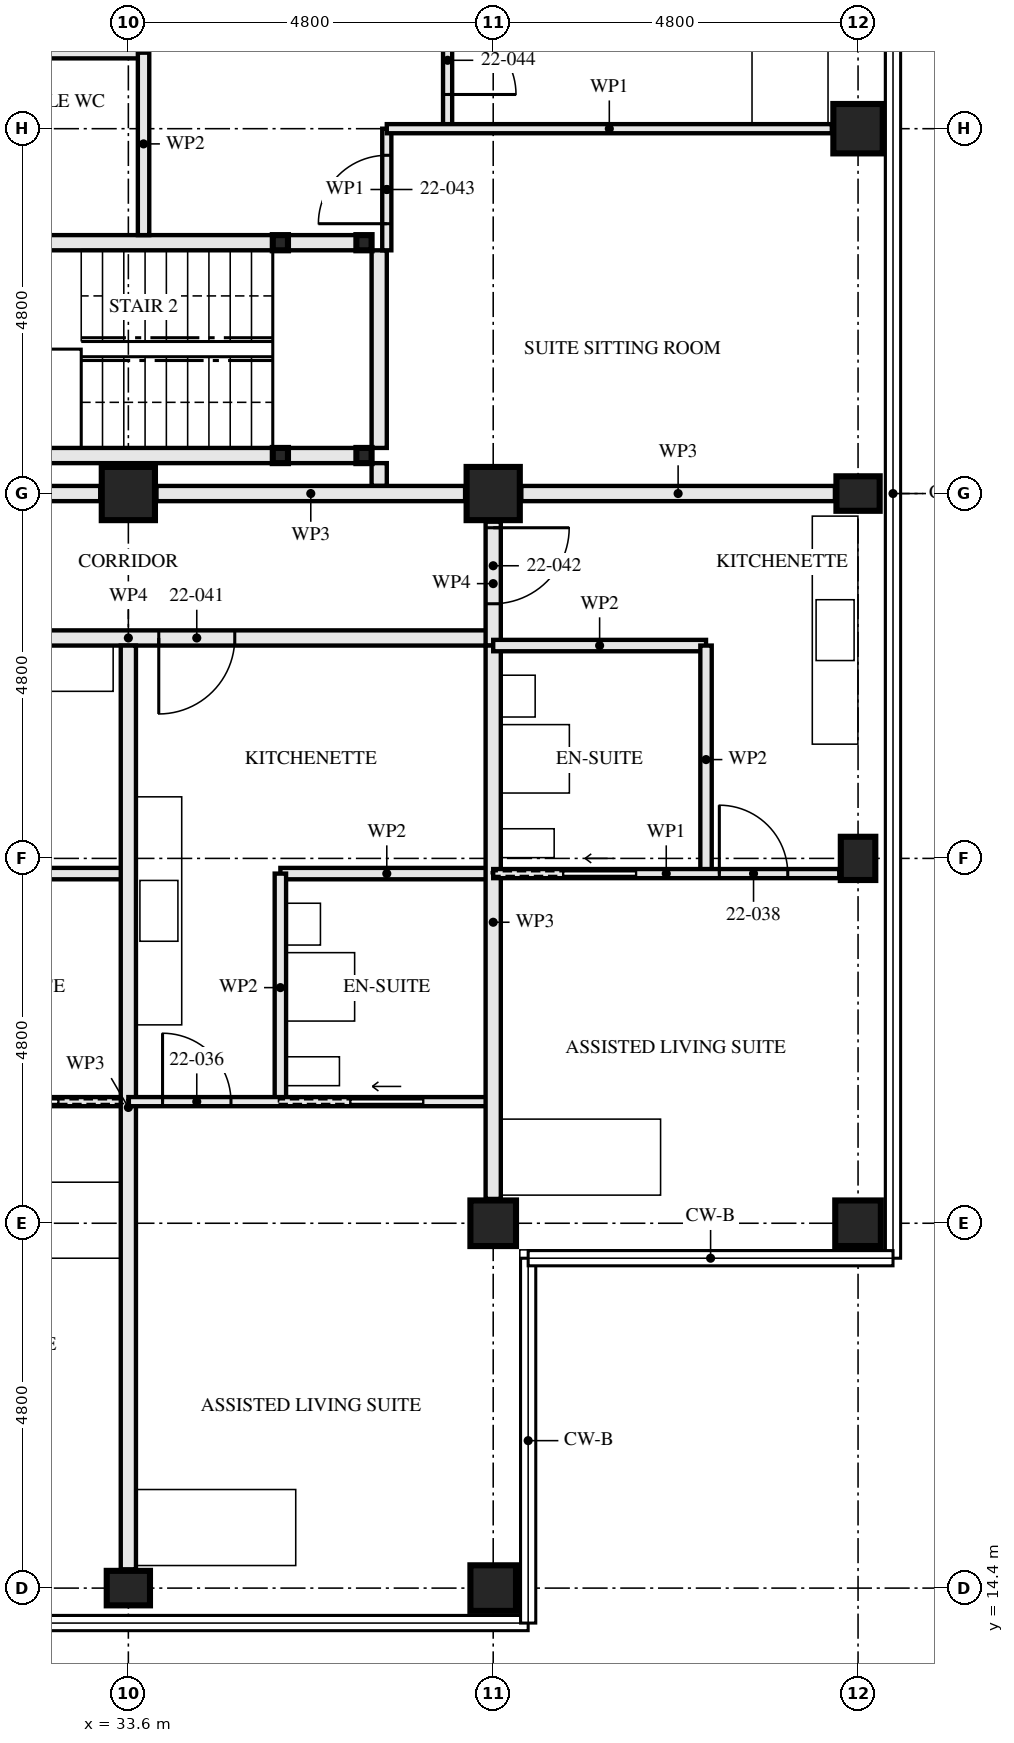
"""IFC4 building model, lengths in metres.
Left out: names, types, materials, properties, quantities, classifications, styles, units other than length and angle.
Written with IfcOpenShell. Run it as: python <this file> out.ifc"""

import sys

from ifc_helpers import new_model, si_unit, direction, frame, frame_2d, origin, origin_2d, place, context, subcontext, project, spatial, rectangle, hollow_rectangle, i_section, extrude, element, fill, save


model = new_model("IFC4")
c1 = context("Model", 3, precision=1e-05, world=origin(), true_north=direction((0.0, 1.0)))
c2 = subcontext(c1, "Body", "Model", "MODEL_VIEW")
j1 = project(units=[si_unit("LENGTHUNIT", "METRE"), si_unit("PLANEANGLEUNIT", "RADIAN")], contexts=[c1])
p1 = place(None, origin())
s1 = spatial("IfcSite", under=j1, at=p1, CompositionType="ELEMENT")
p2 = place(p1, origin())
s2 = spatial("IfcBuilding", under=s1, at=p2, CompositionType="ELEMENT")
p3 = place(p2, frame((0.0, 0.0, 84.0)))
s3 = spatial("IfcBuildingStorey", under=s2, at=p3, CompositionType="ELEMENT", Elevation=84.0)
p4 = place(p3, frame((33.6, 14.4, 0.0), z_axis=(0.0, 0.0, 1.0), x_axis=(0.0, 1.0, 0.0)))
e1 = element("IfcColumn", 1, at=p4, inside=s3, PredefinedType="COLUMN", context=c2, shape_type="SweptSolid", body=[
    extrude(i_section(OverallWidth=0.454, OverallDepth=0.569, WebThickness=0.078, FlangeThickness=0.125, FilletRadius=0.015, at=origin_2d()), origin(), (0.0, 0.0, 1.0), 3.5),
])
p5 = place(p3, frame((33.6, 28.8, 0.0), z_axis=(0.0, 0.0, 1.0), x_axis=(0.0, 1.0, 0.0)))
e2 = element("IfcColumn", 2, at=p5, inside=s3, PredefinedType="COLUMN", context=c2, shape_type="SweptSolid", body=[
    extrude(hollow_rectangle(XDim=0.7, YDim=0.7, WallThickness=0.06, at=origin_2d()), origin(), (0.0, 0.0, 1.0), 3.5),
])
for number, where, z_axis, x_axis in (
    (3, (38.4, 14.4, 0.0), (0.0, 0.0, 1.0), (0.0, 1.0, 0.0)),
    (4, (38.4, 19.2, 0.0), (0.0, 0.0, 1.0), (0.0, 1.0, 0.0)),
):
    element("IfcColumn", number, at=place(p3, frame(where, z_axis=z_axis, x_axis=x_axis)), inside=s3, PredefinedType="COLUMN", context=c2, shape_type="SweptSolid", body=[
        extrude(hollow_rectangle(XDim=0.6, YDim=0.6, WallThickness=0.05, at=origin_2d()), origin(), (0.0, 0.0, 1.0), 3.5),
    ])
p6 = place(p3, frame((38.4, 28.8, 0.0), z_axis=(0.0, 0.0, 1.0), x_axis=(0.0, 1.0, 0.0)))
e5 = element("IfcColumn", 5, at=p6, inside=s3, PredefinedType="COLUMN", context=c2, shape_type="SweptSolid", body=[
    extrude(hollow_rectangle(XDim=0.7, YDim=0.7, WallThickness=0.06, at=origin_2d()), origin(), (0.0, 0.0, 1.0), 3.5),
])
p7 = place(p3, frame((43.2, 19.2, 0.0), z_axis=(0.0, 0.0, 1.0), x_axis=(0.0, 1.0, 0.0)))
e6 = element("IfcColumn", 6, at=p7, inside=s3, PredefinedType="COLUMN", context=c2, shape_type="SweptSolid", body=[
    extrude(hollow_rectangle(XDim=0.6, YDim=0.6, WallThickness=0.05, at=origin_2d()), origin(), (0.0, 0.0, 1.0), 3.5),
])
for number, where, z_axis, x_axis in (
    (7, (43.2, 24.0, 0.0), (0.0, 0.0, 1.0), (1.0, 0.0, 0.0)),
    (8, (43.2, 28.8, 0.0), (0.0, 0.0, 1.0), (0.0, 1.0, 0.0)),
):
    element("IfcColumn", number, at=place(p3, frame(where, z_axis=z_axis, x_axis=x_axis)), inside=s3, PredefinedType="COLUMN", context=c2, shape_type="SweptSolid", body=[
        extrude(i_section(OverallWidth=0.454, OverallDepth=0.569, WebThickness=0.078, FlangeThickness=0.125, FilletRadius=0.015, at=origin_2d()), origin(), (0.0, 0.0, 1.0), 3.5),
    ])
p8 = place(p3, frame((43.2, 33.6, 0.0), z_axis=(0.0, 0.0, 1.0), x_axis=(1.0, 0.0, 0.0)))
e9 = element("IfcColumn", 9, at=p8, inside=s3, PredefinedType="COLUMN", context=c2, shape_type="SweptSolid", body=[
    extrude(hollow_rectangle(XDim=0.65, YDim=0.65, WallThickness=0.08, at=origin_2d()), origin(), (0.0, 0.0, 1.0), 3.5),
])
for number, where, z_axis, x_axis in (
    (10, (36.7, 29.3, 0.0), (0.0, 0.0, 1.0), (1.0, 0.0, 0.0)),
    (11, (36.7, 32.1, 0.0), (0.0, 0.0, 1.0), (1.0, 0.0, 0.0)),
    (12, (35.6, 29.3, 0.0), (0.0, 0.0, 1.0), (1.0, 0.0, 0.0)),
    (13, (35.6, 32.1, 0.0), (0.0, 0.0, 1.0), (1.0, 0.0, 0.0)),
):
    element("IfcColumn", number, at=place(p3, frame(where, z_axis=z_axis, x_axis=x_axis)), inside=s3, PredefinedType="COLUMN", context=c2, shape_type="SweptSolid", body=[
        extrude(hollow_rectangle(XDim=0.2, YDim=0.2, WallThickness=0.008, at=origin_2d()), origin(), (0.0, 0.0, 1.0), 3.33),
    ])
p9 = place(p3, frame((30.8, 23.8, 0.0), z_axis=(0.0, 0.0, 1.0), x_axis=(1.0, 0.0, 0.0)))
e14 = element("IfcWall", 14, at=p9, inside=s3, PredefinedType="PARTITIONING", context=c2, shape_type="SweptSolid", body=[
    extrude(rectangle(XDim=2.8, YDim=0.15, at=frame_2d((1.4, 0.0))), origin(), (0.0, 0.0, 1.0), 3.33),
])
p10 = place(p3, frame((28.8, 20.8, 0.0), z_axis=(0.0, 0.0, 1.0), x_axis=(1.0, 0.0, 0.0)))
e15 = element("IfcWall", 15, at=p10, inside=s3, PredefinedType="PARTITIONING", context=c2, shape_type="SweptSolid", body=[
    extrude(rectangle(XDim=4.8, YDim=0.12, at=frame_2d((2.4, 0.0))), origin(), (0.0, 0.0, 1.0), 3.33),
])
p11 = place(p10, frame((0.45, 0.0, 0.0)))
e16 = element("IfcOpeningElement", 16, at=p11, cuts=e15, PredefinedType="OPENING", context=c2, shape_type="SweptSolid", body=[
    extrude(rectangle(XDim=0.9, YDim=2.1, at=frame_2d((0.45, 1.05))), frame((0.0, 0.071, 0.0), z_axis=(0.0, -1.0, 0.0), x_axis=(1.0, 0.0, 0.0)), (0.0, 0.0, 1.0), 0.141),
])
p12 = place(p10, frame((2.925, 0.0, 0.0)))
e17 = element("IfcOpeningElement", 17, at=p12, cuts=e15, PredefinedType="OPENING", context=c2, shape_type="SweptSolid", body=[
    extrude(rectangle(XDim=0.95, YDim=2.1, at=frame_2d((0.475, 1.05))), frame((0.0, 0.071, 0.0), z_axis=(0.0, -1.0, 0.0), x_axis=(1.0, 0.0, 0.0)), (0.0, 0.0, 1.0), 0.141),
])
p13 = place(p3, frame((33.6, 14.647, 0.0), z_axis=(0.0, 0.0, 1.0), x_axis=(0.0, 1.0, 0.0)))
e18 = element("IfcWall", 18, at=p13, inside=s3, PredefinedType="PARTITIONING", context=c2, shape_type="SweptSolid", body=[
    extrude(rectangle(XDim=12.153, YDim=0.2, at=frame_2d((6.077, 0.0))), origin(), (0.0, 0.0, 1.0), 2.55),
])
p14 = place(p3, frame((35.6, 20.8, 0.0), z_axis=(0.0, 0.0, 1.0), x_axis=(0.0, 1.0, 0.0)))
e19 = element("IfcWall", 19, at=p14, inside=s3, PredefinedType="PARTITIONING", context=c2, shape_type="SweptSolid", body=[
    extrude(rectangle(XDim=3.0, YDim=0.15, at=frame_2d((1.5, 0.0))), origin(), (0.0, 0.0, 1.0), 3.33),
])
p15 = place(p3, frame((35.6, 23.8, 0.0), z_axis=(0.0, 0.0, 1.0), x_axis=(1.0, 0.0, 0.0)))
e20 = element("IfcWall", 20, at=p15, inside=s3, PredefinedType="PARTITIONING", context=c2, shape_type="SweptSolid", body=[
    extrude(rectangle(XDim=2.8, YDim=0.15, at=frame_2d((1.4, 0.0))), origin(), (0.0, 0.0, 1.0), 3.33),
])
p16 = place(p3, frame((33.6, 20.8, 0.0), z_axis=(0.0, 0.0, 1.0), x_axis=(1.0, 0.0, 0.0)))
e21 = element("IfcWall", 21, at=p16, inside=s3, PredefinedType="PARTITIONING", context=c2, shape_type="SweptSolid", body=[
    extrude(rectangle(XDim=4.8, YDim=0.12, at=frame_2d((2.4, 0.0))), origin(), (0.0, 0.0, 1.0), 3.33),
])
p17 = place(p16, frame((0.45, 0.0, 0.0)))
e22 = element("IfcOpeningElement", 22, at=p17, cuts=e21, PredefinedType="OPENING", context=c2, shape_type="SweptSolid", body=[
    extrude(rectangle(XDim=0.9, YDim=2.1, at=frame_2d((0.45, 1.05))), frame((0.0, 0.071, 0.0), z_axis=(0.0, -1.0, 0.0), x_axis=(1.0, 0.0, 0.0)), (0.0, 0.0, 1.0), 0.141),
])
p18 = place(p16, frame((2.925, 0.0, 0.0)))
e23 = element("IfcOpeningElement", 23, at=p18, cuts=e21, PredefinedType="OPENING", context=c2, shape_type="SweptSolid", body=[
    extrude(rectangle(XDim=0.95, YDim=2.1, at=frame_2d((0.475, 1.05))), frame((0.0, 0.071, 0.0), z_axis=(0.0, -1.0, 0.0), x_axis=(1.0, 0.0, 0.0)), (0.0, 0.0, 1.0), 0.141),
])
p19 = place(p3, frame((38.4, 19.52, 0.0), z_axis=(0.0, 0.0, 1.0), x_axis=(0.0, 1.0, 0.0)))
e24 = element("IfcWall", 24, at=p19, inside=s3, PredefinedType="PARTITIONING", context=c2, shape_type="SweptSolid", body=[
    extrude(rectangle(XDim=7.28, YDim=0.2, at=frame_2d((3.64, 0.0))), origin(), (0.0, 0.0, 1.0), 2.55),
])
p20 = place(p3, frame((41.2, 23.8, 0.0), z_axis=(0.0, 0.0, 1.0), x_axis=(0.0, 1.0, 0.0)))
e25 = element("IfcWall", 25, at=p20, inside=s3, PredefinedType="PARTITIONING", context=c2, shape_type="SweptSolid", body=[
    extrude(rectangle(XDim=3.0, YDim=0.15, at=frame_2d((1.5, 0.0))), origin(), (0.0, 0.0, 1.0), 2.55),
])
p21 = place(p3, frame((38.4, 26.8, 0.0), z_axis=(0.0, 0.0, 1.0), x_axis=(1.0, 0.0, 0.0)))
e26 = element("IfcWall", 26, at=p21, inside=s3, PredefinedType="PARTITIONING", context=c2, shape_type="SweptSolid", body=[
    extrude(rectangle(XDim=2.8, YDim=0.15, at=frame_2d((1.4, 0.0))), origin(), (0.0, 0.0, 1.0), 3.33),
])
p22 = place(p3, frame((38.4, 23.8, 0.0), z_axis=(0.0, 0.0, 1.0), x_axis=(1.0, 0.0, 0.0)))
e27 = element("IfcWall", 27, at=p22, inside=s3, PredefinedType="PARTITIONING", context=c2, shape_type="SweptSolid", body=[
    extrude(rectangle(XDim=4.553, YDim=0.12, at=frame_2d((2.276, 0.0))), origin(), (0.0, 0.0, 1.0), 3.33),
])
p23 = place(p22, frame((2.975, 0.0, 0.0)))
e28 = element("IfcOpeningElement", 28, at=p23, cuts=e27, PredefinedType="OPENING", context=c2, shape_type="SweptSolid", body=[
    extrude(rectangle(XDim=0.9, YDim=2.1, at=frame_2d((0.45, 1.05))), frame((0.0, 0.071, 0.0), z_axis=(0.0, -1.0, 0.0), x_axis=(1.0, 0.0, 0.0)), (0.0, 0.0, 1.0), 0.141),
])
p24 = place(p22, frame((0.925, 0.0, 0.0)))
e29 = element("IfcOpeningElement", 29, at=p24, cuts=e27, PredefinedType="OPENING", context=c2, shape_type="SweptSolid", body=[
    extrude(rectangle(XDim=0.95, YDim=2.1, at=frame_2d((0.475, 1.05))), frame((0.0, 0.071, 0.0), z_axis=(0.0, -1.0, 0.0), x_axis=(1.0, 0.0, 0.0)), (0.0, 0.0, 1.0), 0.141),
])
p25 = place(p3, frame((28.8, 26.9, 0.0), z_axis=(0.0, 0.0, 1.0), x_axis=(1.0, 0.0, 0.0)))
e30 = element("IfcWall", 30, at=p25, inside=s3, PredefinedType="PARTITIONING", context=c2, shape_type="SweptSolid", body=[
    extrude(rectangle(XDim=9.6, YDim=0.2, at=frame_2d((4.8, 0.0))), origin(), (0.0, 0.0, 1.0), 3.33),
])
p26 = place(p25, frame((0.4, 0.0, 0.0)))
e31 = element("IfcOpeningElement", 31, at=p26, cuts=e30, PredefinedType="OPENING", context=c2, shape_type="SweptSolid", body=[
    extrude(rectangle(XDim=1.0, YDim=2.1, at=frame_2d((0.5, 1.05))), frame((0.0, 0.111, 0.0), z_axis=(0.0, -1.0, 0.0), x_axis=(1.0, 0.0, 0.0)), (0.0, 0.0, 1.0), 0.221),
])
p27 = place(p25, frame((5.2, 0.0, 0.0)))
e32 = element("IfcOpeningElement", 32, at=p27, cuts=e30, PredefinedType="OPENING", context=c2, shape_type="SweptSolid", body=[
    extrude(rectangle(XDim=1.0, YDim=2.1, at=frame_2d((0.5, 1.05))), frame((0.0, 0.111, 0.0), z_axis=(0.0, -1.0, 0.0), x_axis=(1.0, 0.0, 0.0)), (0.0, 0.0, 1.0), 0.221),
])
p28 = place(p3, frame((38.4, 26.8, 0.0), z_axis=(0.0, 0.0, 1.0), x_axis=(0.0, 1.0, 0.0)))
e33 = element("IfcWall", 33, at=p28, inside=s3, PredefinedType="PARTITIONING", context=c2, shape_type="SweptSolid", body=[
    extrude(rectangle(XDim=1.63, YDim=0.2, at=frame_2d((0.815, 0.0))), origin(), (0.0, 0.0, 1.0), 3.33),
])
p29 = place(p28, frame((0.55, 0.0, 0.0)))
e34 = element("IfcOpeningElement", 34, at=p29, cuts=e33, PredefinedType="OPENING", context=c2, shape_type="SweptSolid", body=[
    extrude(rectangle(XDim=1.0, YDim=2.1, at=frame_2d((0.5, 1.05))), frame((0.0, 0.111, 0.0), z_axis=(0.0, -1.0, 0.0), x_axis=(1.0, 0.0, 0.0)), (0.0, 0.0, 1.0), 0.221),
])
p30 = place(p3, frame((36.6, 29.3, 0.0), z_axis=(0.0, 0.0, 1.0), x_axis=(-1.0, 0.0, 0.0)))
e35 = element("IfcWall", 35, at=p30, inside=s3, PredefinedType="SOLIDWALL", context=c2, shape_type="SweptSolid", body=[
    extrude(rectangle(XDim=0.9, YDim=0.2, at=frame_2d((0.45, 0.0))), origin(), (0.0, 0.0, 1.0), 2.99),
])
p31 = place(p3, frame((35.5, 29.3, 0.0), z_axis=(0.0, 0.0, 1.0), x_axis=(-1.0, 0.0, 0.0)))
e36 = element("IfcWall", 36, at=p31, inside=s3, PredefinedType="SOLIDWALL", context=c2, shape_type="SweptSolid", body=[
    extrude(rectangle(XDim=4.7, YDim=0.2, at=frame_2d((2.35, 0.0))), origin(), (0.0, 0.0, 1.0), 2.99),
])
p32 = place(p3, frame((36.6, 32.1, 0.0), z_axis=(0.0, 0.0, 1.0), x_axis=(-1.0, 0.0, 0.0)))
e37 = element("IfcWall", 37, at=p32, inside=s3, PredefinedType="SOLIDWALL", context=c2, shape_type="SweptSolid", body=[
    extrude(rectangle(XDim=0.9, YDim=0.2, at=frame_2d((0.45, 0.0))), origin(), (0.0, 0.0, 1.0), 2.99),
])
p33 = place(p3, frame((35.5, 32.1, 0.0), z_axis=(0.0, 0.0, 1.0), x_axis=(-1.0, 0.0, 0.0)))
e38 = element("IfcWall", 38, at=p33, inside=s3, PredefinedType="SOLIDWALL", context=c2, shape_type="SweptSolid", body=[
    extrude(rectangle(XDim=4.7, YDim=0.2, at=frame_2d((2.35, 0.0))), origin(), (0.0, 0.0, 1.0), 2.99),
])
p34 = place(p3, frame((36.9, 28.9, 0.0), z_axis=(0.0, 0.0, 1.0), x_axis=(0.0, 1.0, 0.0)))
e39 = element("IfcWall", 39, at=p34, inside=s3, PredefinedType="SOLIDWALL", context=c2, shape_type="SweptSolid", body=[
    extrude(rectangle(XDim=0.3, YDim=0.2, at=frame_2d((0.15, 0.0))), origin(), (0.0, 0.0, 1.0), 3.33),
])
p35 = place(p3, frame((36.9, 29.4, 0.0), z_axis=(0.0, 0.0, 1.0), x_axis=(0.0, 1.0, 0.0)))
e40 = element("IfcWall", 40, at=p35, inside=s3, PredefinedType="SOLIDWALL", context=c2, shape_type="SweptSolid", body=[
    extrude(rectangle(XDim=2.6, YDim=0.2, at=frame_2d((1.3, 0.0))), origin(), (0.0, 0.0, 1.0), 3.33),
])
p36 = place(p3, frame((33.8, 32.2, 0.0), z_axis=(0.0, 0.0, 1.0), x_axis=(0.0, 1.0, 0.0)))
e41 = element("IfcWall", 41, at=p36, inside=s3, PredefinedType="PARTITIONING", context=c2, shape_type="SweptSolid", body=[
    extrude(rectangle(XDim=2.4, YDim=0.15, at=frame_2d((1.2, 0.0))), origin(), (0.0, 0.0, 1.0), 2.55),
])
p37 = place(p3, frame((33.8, 34.6, 0.0), z_axis=(0.0, 0.0, 1.0), x_axis=(-1.0, 0.0, 0.0)))
e42 = element("IfcWall", 42, at=p37, inside=s3, PredefinedType="PARTITIONING", context=c2, shape_type="SweptSolid", body=[
    extrude(rectangle(XDim=3.0, YDim=0.15, at=frame_2d((1.5, 0.0))), origin(), (0.0, 0.0, 1.0), 3.33),
])
p38 = place(p3, frame((37.0, 32.0, 0.0), z_axis=(0.0, 0.0, 1.0), x_axis=(0.0, 1.0, 0.0)))
e43 = element("IfcWall", 43, at=p38, inside=s3, PredefinedType="PARTITIONING", context=c2, shape_type="SweptSolid", body=[
    extrude(rectangle(XDim=1.6, YDim=0.12, at=frame_2d((0.8, 0.0))), origin(), (0.0, 0.0, 1.0), 3.33),
])
p39 = place(p38, frame((0.35, 0.0, 0.0)))
e44 = element("IfcOpeningElement", 44, at=p39, cuts=e43, PredefinedType="OPENING", context=c2, shape_type="SweptSolid", body=[
    extrude(rectangle(XDim=0.9, YDim=2.1, at=frame_2d((0.45, 1.05))), frame((0.0, 0.071, 0.0), z_axis=(0.0, -1.0, 0.0), x_axis=(1.0, 0.0, 0.0)), (0.0, 0.0, 1.0), 0.141),
])
p40 = place(p3, frame((37.8, 33.6, 0.0), z_axis=(0.0, 0.0, 1.0), x_axis=(0.0, 1.0, 0.0)))
e45 = element("IfcWall", 45, at=p40, inside=s3, PredefinedType="PARTITIONING", context=c2, shape_type="SweptSolid", body=[
    extrude(rectangle(XDim=4.8, YDim=0.12, at=frame_2d((2.4, 0.0))), origin(), (0.0, 0.0, 1.0), 3.33),
])
p41 = place(p40, frame((0.45, 0.0, 0.0)))
e46 = element("IfcOpeningElement", 46, at=p41, cuts=e45, PredefinedType="OPENING", context=c2, shape_type="SweptSolid", body=[
    extrude(rectangle(XDim=0.9, YDim=2.1, at=frame_2d((0.45, 1.05))), frame((0.0, 0.071, 0.0), z_axis=(0.0, -1.0, 0.0), x_axis=(1.0, 0.0, 0.0)), (0.0, 0.0, 1.0), 0.141),
])
p42 = place(p40, frame((2.925, 0.0, 0.0)))
e47 = element("IfcOpeningElement", 47, at=p42, cuts=e45, PredefinedType="OPENING", context=c2, shape_type="SweptSolid", body=[
    extrude(rectangle(XDim=0.95, YDim=2.1, at=frame_2d((0.475, 1.05))), frame((0.0, 0.071, 0.0), z_axis=(0.0, -1.0, 0.0), x_axis=(1.0, 0.0, 0.0)), (0.0, 0.0, 1.0), 0.141),
])
p43 = place(p3, frame((42.855, 33.6, 0.0), z_axis=(0.0, 0.0, 1.0), x_axis=(-1.0, 0.0, 0.0)))
e48 = element("IfcWall", 48, at=p43, inside=s3, PredefinedType="PARTITIONING", context=c2, shape_type="SweptSolid", body=[
    extrude(rectangle(XDim=5.855, YDim=0.12, at=frame_2d((2.927, 0.0))), origin(), (0.0, 0.0, 1.0), 2.55),
])
p44 = place(p3, frame((42.896, 28.8, 0.0), z_axis=(0.0, 0.0, 1.0), x_axis=(-1.0, 0.0, 0.0)))
e49 = element("IfcWall", 49, at=p44, inside=s3, PredefinedType="PARTITIONING", context=c2, shape_type="SweptSolid", body=[
    extrude(rectangle(XDim=4.125, YDim=0.2, at=frame_2d((2.063, 0.0))), origin(), (0.0, 0.0, 1.0), 2.32),
])
p45 = place(p3, frame((38.03, 28.8, 0.0), z_axis=(0.0, 0.0, 1.0), x_axis=(-1.0, 0.0, 0.0)))
e50 = element("IfcWall", 50, at=p45, inside=s3, PredefinedType="PARTITIONING", context=c2, shape_type="SweptSolid", body=[
    extrude(rectangle(XDim=4.06, YDim=0.2, at=frame_2d((2.03, 0.0))), origin(), (0.0, 0.0, 1.0), 2.32),
])
p46 = place(p3, frame((33.23, 28.8, 0.0), z_axis=(0.0, 0.0, 1.0), x_axis=(-1.0, 0.0, 0.0)))
e51 = element("IfcWall", 51, at=p46, inside=s3, PredefinedType="PARTITIONING", context=c2, shape_type="SweptSolid", body=[
    extrude(rectangle(XDim=2.53, YDim=0.2, at=frame_2d((1.265, 0.0))), origin(), (0.0, 0.0, 1.0), 2.32),
])
p47 = place(p12, origin())
e52 = element("IfcDoor", 52, at=p47, inside=s3, OperationType="SLIDING_TO_LEFT", PredefinedType="DOOR", context=c2, shape_type="SweptSolid", body=[
    extrude(rectangle(XDim=0.95, YDim=2.1, at=frame_2d((0.475, 1.05))), frame((0.0, 0.022, 0.0), z_axis=(0.0, -1.0, 0.0), x_axis=(1.0, 0.0, 0.0)), (0.0, 0.0, 1.0), 0.044),
])
fill(e17, e52)
p48 = place(p17, origin())
e53 = element("IfcDoor", 53, at=p48, inside=s3, OperationType="SINGLE_SWING_RIGHT", PredefinedType="DOOR", context=c2, shape_type="SweptSolid", body=[
    extrude(rectangle(XDim=0.9, YDim=2.1, at=frame_2d((0.45, 1.05))), frame((0.0, 0.022, 0.0), z_axis=(0.0, -1.0, 0.0), x_axis=(1.0, 0.0, 0.0)), (0.0, 0.0, 1.0), 0.044),
])
fill(e22, e53)
p49 = place(p18, origin())
e54 = element("IfcDoor", 54, at=p49, inside=s3, OperationType="SLIDING_TO_RIGHT", PredefinedType="DOOR", context=c2, shape_type="SweptSolid", body=[
    extrude(rectangle(XDim=0.95, YDim=2.1, at=frame_2d((0.475, 1.05))), frame((0.0, 0.022, 0.0), z_axis=(0.0, -1.0, 0.0), x_axis=(1.0, 0.0, 0.0)), (0.0, 0.0, 1.0), 0.044),
])
fill(e23, e54)
p50 = place(p23, origin())
e55 = element("IfcDoor", 55, at=p50, inside=s3, OperationType="SINGLE_SWING_RIGHT", PredefinedType="DOOR", context=c2, shape_type="SweptSolid", body=[
    extrude(rectangle(XDim=0.9, YDim=2.1, at=frame_2d((0.45, 1.05))), frame((0.0, 0.022, 0.0), z_axis=(0.0, -1.0, 0.0), x_axis=(1.0, 0.0, 0.0)), (0.0, 0.0, 1.0), 0.044),
])
fill(e28, e55)
p51 = place(p24, origin())
e56 = element("IfcDoor", 56, at=p51, inside=s3, OperationType="SLIDING_TO_RIGHT", PredefinedType="DOOR", context=c2, shape_type="SweptSolid", body=[
    extrude(rectangle(XDim=0.95, YDim=2.1, at=frame_2d((0.475, 1.05))), frame((0.0, 0.022, 0.0), z_axis=(0.0, -1.0, 0.0), x_axis=(1.0, 0.0, 0.0)), (0.0, 0.0, 1.0), 0.044),
])
fill(e29, e56)
p52 = place(p27, frame((1.0, 0.0, 0.0), z_axis=(0.0, 0.0, 1.0), x_axis=(-1.0, 0.0, 0.0)))
e57 = element("IfcDoor", 57, at=p52, inside=s3, OperationType="SINGLE_SWING_LEFT", PredefinedType="DOOR", context=c2, shape_type="SweptSolid", body=[
    extrude(rectangle(XDim=1.0, YDim=2.1, at=frame_2d((0.5, 1.05))), frame((0.0, 0.027, 0.0), z_axis=(0.0, -1.0, 0.0), x_axis=(1.0, 0.0, 0.0)), (0.0, 0.0, 1.0), 0.054),
])
fill(e32, e57)
p53 = place(p29, frame((1.0, 0.0, 0.0), z_axis=(0.0, 0.0, 1.0), x_axis=(-1.0, 0.0, 0.0)))
e58 = element("IfcDoor", 58, at=p53, inside=s3, OperationType="SINGLE_SWING_RIGHT", PredefinedType="DOOR", context=c2, shape_type="SweptSolid", body=[
    extrude(rectangle(XDim=1.0, YDim=2.1, at=frame_2d((0.5, 1.05))), frame((0.0, 0.027, 0.0), z_axis=(0.0, -1.0, 0.0), x_axis=(1.0, 0.0, 0.0)), (0.0, 0.0, 1.0), 0.054),
])
fill(e34, e58)
p54 = place(p39, origin())
e59 = element("IfcDoor", 59, at=p54, inside=s3, OperationType="SINGLE_SWING_RIGHT", PredefinedType="DOOR", context=c2, shape_type="SweptSolid", body=[
    extrude(rectangle(XDim=0.9, YDim=2.1, at=frame_2d((0.45, 1.05))), frame((0.0, 0.022, 0.0), z_axis=(0.0, -1.0, 0.0), x_axis=(1.0, 0.0, 0.0)), (0.0, 0.0, 1.0), 0.044),
])
fill(e44, e59)
p55 = place(p41, frame((0.9, 0.0, 0.0), z_axis=(0.0, 0.0, 1.0), x_axis=(-1.0, 0.0, 0.0)))
e60 = element("IfcDoor", 60, at=p55, inside=s3, OperationType="SINGLE_SWING_LEFT", PredefinedType="DOOR", context=c2, shape_type="SweptSolid", body=[
    extrude(rectangle(XDim=0.9, YDim=2.1, at=frame_2d((0.45, 1.05))), frame((0.0, 0.022, 0.0), z_axis=(0.0, -1.0, 0.0), x_axis=(1.0, 0.0, 0.0)), (0.0, 0.0, 1.0), 0.044),
])
fill(e46, e60)
save(model, sys.argv[1])
